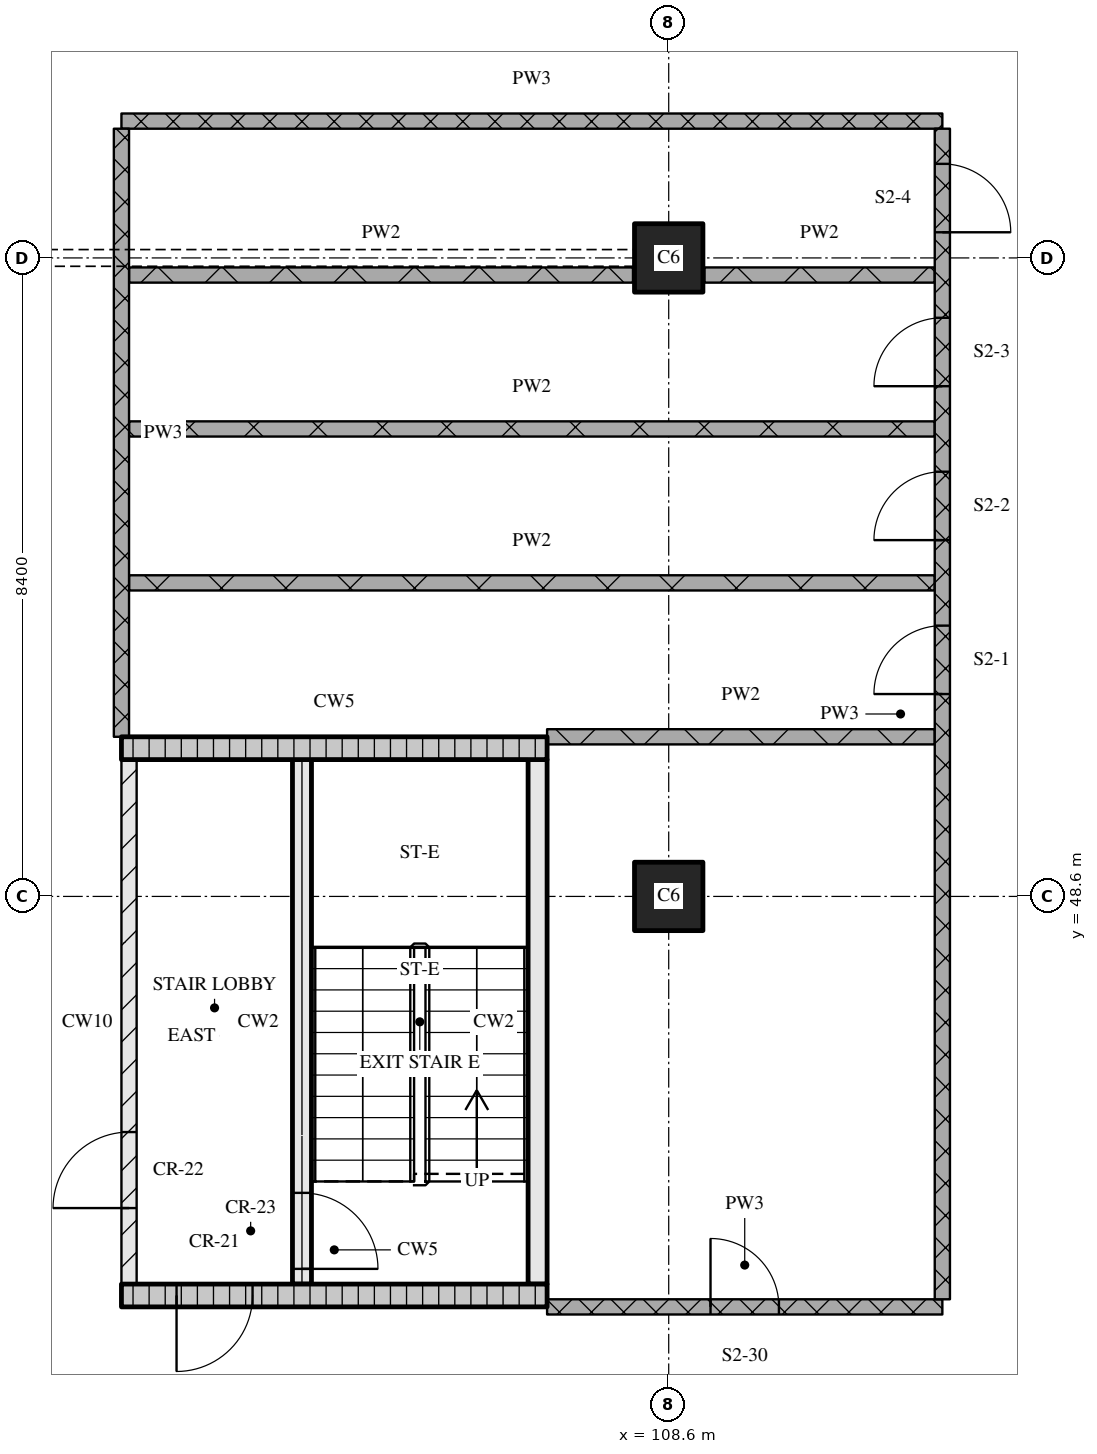
"""IFC4 building model, lengths in metres.
Left out: names, types, materials, properties, quantities, classifications, styles, units other than length and angle.
Written with IfcOpenShell. Run it as: python <this file> out.ifc"""

import sys

from ifc_helpers import new_model, si_unit, direction, frame, frame_2d, origin, origin_2d, place, context, subcontext, project, spatial, rectangle, extrude, element, fill, save


model = new_model("IFC4")
c1 = context("Model", 3, precision=1e-05, world=origin(), true_north=direction((0.0, 1.0)))
c2 = subcontext(c1, "Body", "Model", "MODEL_VIEW")
j1 = project(units=[si_unit("LENGTHUNIT", "METRE"), si_unit("PLANEANGLEUNIT", "RADIAN")], contexts=[c1])
p1 = place(None, origin())
s1 = spatial("IfcSite", under=j1, at=p1, CompositionType="ELEMENT")
p2 = place(p1, origin())
s2 = spatial("IfcBuilding", under=s1, at=p2, CompositionType="ELEMENT")
p3 = place(p2, frame((0.0, 0.0, 23.7)))
s3 = spatial("IfcBuildingStorey", under=s2, at=p3, CompositionType="ELEMENT", Elevation=23.7)
for number, where, z_axis, x_axis in (
    (1, (108.6, 48.6, 0.0), (0.0, 0.0, 1.0), (1.0, 0.0, 0.0)),
    (2, (108.6, 57.0, 0.0), (0.0, 0.0, 1.0), (1.0, 0.0, 0.0)),
):
    element("IfcColumn", number, at=place(p3, frame(where, z_axis=z_axis, x_axis=x_axis)), inside=s3, PredefinedType="COLUMN", context=c2, shape_type="SweptSolid", body=[
        extrude(rectangle(XDim=0.9, YDim=0.9, at=origin_2d()), origin(), (0.0, 0.0, 1.0), 4.5),
    ])
p4 = place(p3, frame((101.4, 43.35, 0.0), z_axis=(0.0, 0.0, 1.0), x_axis=(1.0, 0.0, 0.0)))
e3 = element("IfcWall", 3, at=p4, inside=s3, PredefinedType="SOLIDWALL", context=c2, shape_type="SweptSolid", body=[
    extrude(rectangle(XDim=5.6, YDim=0.3, at=frame_2d((2.8, 0.0))), origin(), (0.0, 0.0, 1.0), 4.2),
])
p5 = place(p4, frame((0.725, 0.0, 0.0)))
e4 = element("IfcOpeningElement", 4, at=p5, cuts=e3, PredefinedType="OPENING", context=c2, shape_type="SweptSolid", body=[
    extrude(rectangle(XDim=1.0, YDim=2.1, at=frame_2d((0.5, 1.05))), frame((0.0, 0.16, 0.0), z_axis=(0.0, -1.0, 0.0), x_axis=(1.0, 0.0, 0.0)), (0.0, 0.0, 1.0), 0.32),
])
p6 = place(p3, frame((101.5, 43.5, 0.0), z_axis=(0.0, 0.0, 1.0), x_axis=(0.0, 1.0, 0.0)))
e5 = element("IfcWall", 5, at=p6, inside=s3, PredefinedType="PARTITIONING", context=c2, shape_type="SweptSolid", body=[
    extrude(rectangle(XDim=6.9, YDim=0.2, at=frame_2d((3.45, 0.0))), origin(), (0.0, 0.0, 1.0), 4.2),
])
p7 = place(p6, frame((1.0, 0.0, 0.0)))
e6 = element("IfcOpeningElement", 6, at=p7, cuts=e5, PredefinedType="OPENING", context=c2, shape_type="SweptSolid", body=[
    extrude(rectangle(XDim=1.0, YDim=2.1, at=frame_2d((0.5, 1.05))), frame((0.0, 0.11, 0.0), z_axis=(0.0, -1.0, 0.0), x_axis=(1.0, 0.0, 0.0)), (0.0, 0.0, 1.0), 0.22),
])
p8 = place(p3, frame((103.775, 43.5, 0.0), z_axis=(0.0, 0.0, 1.0), x_axis=(0.0, 1.0, 0.0)))
e7 = element("IfcWall", 7, at=p8, inside=s3, PredefinedType="SOLIDWALL", context=c2, shape_type="SweptSolid", body=[
    extrude(rectangle(XDim=6.9, YDim=0.25, at=frame_2d((3.45, 0.0))), origin(), (0.0, 0.0, 1.0), 4.2),
])
p9 = place(p8, frame((0.2, 0.0, 0.0)))
e8 = element("IfcOpeningElement", 8, at=p9, cuts=e7, PredefinedType="OPENING", context=c2, shape_type="SweptSolid", body=[
    extrude(rectangle(XDim=1.0, YDim=2.1, at=frame_2d((0.5, 1.05))), frame((0.0, 0.135, 0.0), z_axis=(0.0, -1.0, 0.0), x_axis=(1.0, 0.0, 0.0)), (0.0, 0.0, 1.0), 0.27),
])
p10 = place(p3, frame((106.875, 43.5, 0.0), z_axis=(0.0, 0.0, 1.0), x_axis=(0.0, 1.0, 0.0)))
e9 = element("IfcWall", 9, at=p10, inside=s3, PredefinedType="SOLIDWALL", context=c2, shape_type="SweptSolid", body=[
    extrude(rectangle(XDim=6.9, YDim=0.25, at=frame_2d((3.45, 0.0))), origin(), (0.0, 0.0, 1.0), 4.2),
])
p11 = place(p3, frame((101.4, 50.55, 0.0), z_axis=(0.0, 0.0, 1.0), x_axis=(1.0, 0.0, 0.0)))
e10 = element("IfcWall", 10, at=p11, inside=s3, PredefinedType="SOLIDWALL", context=c2, shape_type="SweptSolid", body=[
    extrude(rectangle(XDim=5.6, YDim=0.3, at=frame_2d((2.8, 0.0))), origin(), (0.0, 0.0, 1.0), 4.2),
])
p12 = place(p3, frame((107.0, 43.2, 0.0), z_axis=(0.0, 0.0, 1.0), x_axis=(1.0, 0.0, 0.0)))
e11 = element("IfcWall", 11, at=p12, inside=s3, PredefinedType="PARTITIONING", context=c2, shape_type="SweptSolid", body=[
    extrude(rectangle(XDim=5.2, YDim=0.2, at=frame_2d((2.6, 0.0))), origin(), (0.0, 0.0, 1.0), 4.2),
])
p13 = place(p12, frame((2.15, 0.0, 0.0)))
e12 = element("IfcOpeningElement", 12, at=p13, cuts=e11, PredefinedType="OPENING", context=c2, shape_type="SweptSolid", body=[
    extrude(rectangle(XDim=0.9, YDim=2.1, at=frame_2d((0.45, 1.05))), frame((0.0, 0.11, 0.0), z_axis=(0.0, -1.0, 0.0), x_axis=(1.0, 0.0, 0.0)), (0.0, 0.0, 1.0), 0.22),
])
p14 = place(p3, frame((107.0, 50.7, 0.0), z_axis=(0.0, 0.0, 1.0), x_axis=(1.0, 0.0, 0.0)))
e13 = element("IfcWall", 13, at=p14, inside=s3, PredefinedType="PARTITIONING", context=c2, shape_type="SweptSolid", body=[
    extrude(rectangle(XDim=5.1, YDim=0.2, at=frame_2d((2.55, 0.0))), origin(), (0.0, 0.0, 1.0), 4.2),
])
for number, where, z_axis, x_axis in (
    (14, (101.5, 52.725, 0.0), (0.0, 0.0, 1.0), (1.0, 0.0, 0.0)),
    (15, (101.5, 54.75, 0.0), (0.0, 0.0, 1.0), (1.0, 0.0, 0.0)),
):
    element("IfcWall", number, at=place(p3, frame(where, z_axis=z_axis, x_axis=x_axis)), inside=s3, PredefinedType="PARTITIONING", context=c2, shape_type="SweptSolid", body=[
        extrude(rectangle(XDim=10.6, YDim=0.2, at=frame_2d((5.3, 0.0))), origin(), (0.0, 0.0, 1.0), 4.2),
    ])
p15 = place(p3, frame((101.5, 56.775, 0.0), z_axis=(0.0, 0.0, 1.0), x_axis=(1.0, 0.0, 0.0)))
e16 = element("IfcWall", 16, at=p15, inside=s3, PredefinedType="PARTITIONING", context=c2, shape_type="SweptSolid", body=[
    extrude(rectangle(XDim=6.63, YDim=0.2, at=frame_2d((3.315, 0.0))), origin(), (0.0, 0.0, 1.0), 4.2),
])
p16 = place(p3, frame((109.07, 56.775, 0.0), z_axis=(0.0, 0.0, 1.0), x_axis=(1.0, 0.0, 0.0)))
e17 = element("IfcWall", 17, at=p16, inside=s3, PredefinedType="PARTITIONING", context=c2, shape_type="SweptSolid", body=[
    extrude(rectangle(XDim=3.03, YDim=0.2, at=frame_2d((1.515, 0.0))), origin(), (0.0, 0.0, 1.0), 4.2),
])
p17 = place(p3, frame((101.4, 58.8, 0.0), z_axis=(0.0, 0.0, 1.0), x_axis=(1.0, 0.0, 0.0)))
e18 = element("IfcWall", 18, at=p17, inside=s3, PredefinedType="PARTITIONING", context=c2, shape_type="SweptSolid", body=[
    extrude(rectangle(XDim=10.8, YDim=0.2, at=frame_2d((5.4, 0.0))), origin(), (0.0, 0.0, 1.0), 4.2),
])
p18 = place(p3, frame((101.4, 58.7, 0.0), z_axis=(0.0, 0.0, 1.0), x_axis=(0.0, -1.0, 0.0)))
e19 = element("IfcWall", 19, at=p18, inside=s3, PredefinedType="PARTITIONING", context=c2, shape_type="SweptSolid", body=[
    extrude(rectangle(XDim=8.0, YDim=0.2, at=frame_2d((4.0, 0.0))), origin(), (0.0, 0.0, 1.0), 4.2),
])
p19 = place(p3, frame((112.2, 43.3, 0.0), z_axis=(0.0, 0.0, 1.0), x_axis=(0.0, 1.0, 0.0)))
e20 = element("IfcWall", 20, at=p19, inside=s3, PredefinedType="PARTITIONING", context=c2, shape_type="SweptSolid", body=[
    extrude(rectangle(XDim=15.4, YDim=0.2, at=frame_2d((7.7, 0.0))), origin(), (0.0, 0.0, 1.0), 4.2),
])
p20 = place(p19, frame((7.962, 0.0, 0.0)))
e21 = element("IfcOpeningElement", 21, at=p20, cuts=e20, PredefinedType="OPENING", context=c2, shape_type="SweptSolid", body=[
    extrude(rectangle(XDim=0.9, YDim=2.1, at=frame_2d((0.45, 1.05))), frame((0.0, 0.11, 0.0), z_axis=(0.0, -1.0, 0.0), x_axis=(1.0, 0.0, 0.0)), (0.0, 0.0, 1.0), 0.22),
])
p21 = place(p19, frame((9.988, 0.0, 0.0)))
e22 = element("IfcOpeningElement", 22, at=p21, cuts=e20, PredefinedType="OPENING", context=c2, shape_type="SweptSolid", body=[
    extrude(rectangle(XDim=0.9, YDim=2.1, at=frame_2d((0.45, 1.05))), frame((0.0, 0.11, 0.0), z_axis=(0.0, -1.0, 0.0), x_axis=(1.0, 0.0, 0.0)), (0.0, 0.0, 1.0), 0.22),
])
p22 = place(p19, frame((12.012, 0.0, 0.0)))
e23 = element("IfcOpeningElement", 23, at=p22, cuts=e20, PredefinedType="OPENING", context=c2, shape_type="SweptSolid", body=[
    extrude(rectangle(XDim=0.9, YDim=2.1, at=frame_2d((0.45, 1.05))), frame((0.0, 0.11, 0.0), z_axis=(0.0, -1.0, 0.0), x_axis=(1.0, 0.0, 0.0)), (0.0, 0.0, 1.0), 0.22),
])
p23 = place(p19, frame((14.038, 0.0, 0.0)))
e24 = element("IfcOpeningElement", 24, at=p23, cuts=e20, PredefinedType="OPENING", context=c2, shape_type="SweptSolid", body=[
    extrude(rectangle(XDim=0.9, YDim=2.1, at=frame_2d((0.45, 1.05))), frame((0.0, 0.11, 0.0), z_axis=(0.0, -1.0, 0.0), x_axis=(1.0, 0.0, 0.0)), (0.0, 0.0, 1.0), 0.22),
])
p24 = place(p5, origin())
e25 = element("IfcDoor", 25, at=p24, inside=s3, OperationType="SINGLE_SWING_RIGHT", PredefinedType="DOOR", context=c2, shape_type="SweptSolid", body=[
    extrude(rectangle(XDim=1.0, YDim=2.1, at=frame_2d((0.5, 1.05))), frame((0.0, 0.025, 0.0), z_axis=(0.0, -1.0, 0.0), x_axis=(1.0, 0.0, 0.0)), (0.0, 0.0, 1.0), 0.05),
])
fill(e4, e25)
p25 = place(p9, origin())
e26 = element("IfcDoor", 26, at=p25, inside=s3, OperationType="SINGLE_SWING_RIGHT", PredefinedType="DOOR", context=c2, shape_type="SweptSolid", body=[
    extrude(rectangle(XDim=1.0, YDim=2.1, at=frame_2d((0.5, 1.05))), frame((0.0, 0.025, 0.0), z_axis=(0.0, -1.0, 0.0), x_axis=(1.0, 0.0, 0.0)), (0.0, 0.0, 1.0), 0.05),
])
fill(e8, e26)
p26 = place(p7, origin())
e27 = element("IfcDoor", 27, at=p26, inside=s3, OperationType="SINGLE_SWING_LEFT", PredefinedType="DOOR", context=c2, shape_type="SweptSolid", body=[
    extrude(rectangle(XDim=1.0, YDim=2.1, at=frame_2d((0.5, 1.05))), frame((0.0, 0.025, 0.0), z_axis=(0.0, -1.0, 0.0), x_axis=(1.0, 0.0, 0.0)), (0.0, 0.0, 1.0), 0.05),
])
fill(e6, e27)
p27 = place(p13, origin())
e28 = element("IfcDoor", 28, at=p27, inside=s3, OperationType="SINGLE_SWING_LEFT", PredefinedType="DOOR", context=c2, shape_type="SweptSolid", body=[
    extrude(rectangle(XDim=0.9, YDim=2.1, at=frame_2d((0.45, 1.05))), frame((0.0, 0.025, 0.0), z_axis=(0.0, -1.0, 0.0), x_axis=(1.0, 0.0, 0.0)), (0.0, 0.0, 1.0), 0.05),
])
fill(e12, e28)
p28 = place(p20, origin())
e29 = element("IfcDoor", 29, at=p28, inside=s3, OperationType="SINGLE_SWING_LEFT", PredefinedType="DOOR", context=c2, shape_type="SweptSolid", body=[
    extrude(rectangle(XDim=0.9, YDim=2.1, at=frame_2d((0.45, 1.05))), frame((0.0, 0.025, 0.0), z_axis=(0.0, -1.0, 0.0), x_axis=(1.0, 0.0, 0.0)), (0.0, 0.0, 1.0), 0.05),
])
fill(e21, e29)
p29 = place(p21, origin())
e30 = element("IfcDoor", 30, at=p29, inside=s3, OperationType="SINGLE_SWING_LEFT", PredefinedType="DOOR", context=c2, shape_type="SweptSolid", body=[
    extrude(rectangle(XDim=0.9, YDim=2.1, at=frame_2d((0.45, 1.05))), frame((0.0, 0.025, 0.0), z_axis=(0.0, -1.0, 0.0), x_axis=(1.0, 0.0, 0.0)), (0.0, 0.0, 1.0), 0.05),
])
fill(e22, e30)
p30 = place(p22, origin())
e31 = element("IfcDoor", 31, at=p30, inside=s3, OperationType="SINGLE_SWING_LEFT", PredefinedType="DOOR", context=c2, shape_type="SweptSolid", body=[
    extrude(rectangle(XDim=0.9, YDim=2.1, at=frame_2d((0.45, 1.05))), frame((0.0, 0.025, 0.0), z_axis=(0.0, -1.0, 0.0), x_axis=(1.0, 0.0, 0.0)), (0.0, 0.0, 1.0), 0.05),
])
fill(e23, e31)
p31 = place(p23, origin())
e32 = element("IfcDoor", 32, at=p31, inside=s3, OperationType="SINGLE_SWING_RIGHT", PredefinedType="DOOR", context=c2, shape_type="SweptSolid", body=[
    extrude(rectangle(XDim=0.9, YDim=2.1, at=frame_2d((0.45, 1.05))), frame((0.0, 0.025, 0.0), z_axis=(0.0, -1.0, 0.0), x_axis=(1.0, 0.0, 0.0)), (0.0, 0.0, 1.0), 0.05),
])
fill(e24, e32)
save(model, sys.argv[1])
